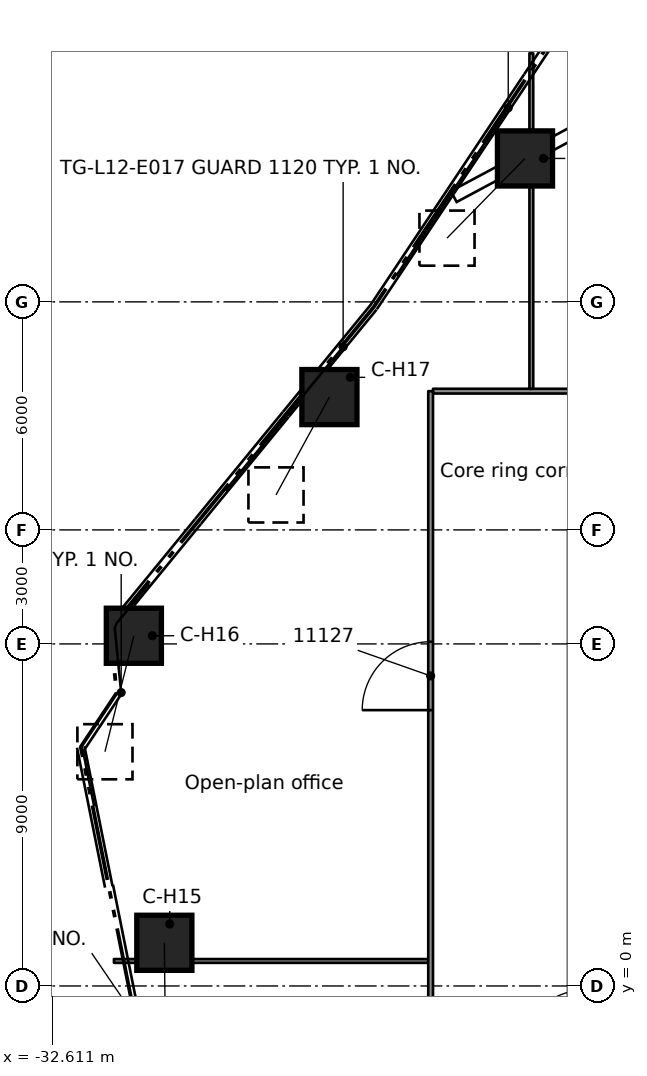
"""IFC4 building model, lengths in metres.
Left out: names, types, materials, properties, quantities, classifications, styles, units other than length and angle.
Written with IfcOpenShell. Run it as: python <this file> out.ifc"""

import sys

from ifc_helpers import new_model, si_unit, direction, frame, frame_2d, origin, origin_2d, place, context, subcontext, project, spatial, rectangle, extrude, element, fill, save


model = new_model("IFC4")
c1 = context("Model", 3, precision=1e-05, world=origin(), true_north=direction((0.0, 1.0)))
c2 = subcontext(c1, "Body", "Model", "MODEL_VIEW")
j1 = project(units=[si_unit("LENGTHUNIT", "METRE"), si_unit("PLANEANGLEUNIT", "RADIAN")], contexts=[c1])
p1 = place(None, origin())
s1 = spatial("IfcSite", under=j1, at=p1, CompositionType="ELEMENT")
p2 = place(p1, origin())
s2 = spatial("IfcBuilding", under=s1, at=p2, CompositionType="ELEMENT")
p3 = place(p2, frame((0.0, 0.0, 54.8)))
s3 = spatial("IfcBuildingStorey", under=s2, at=p3, CompositionType="ELEMENT", Elevation=54.8)
p4 = place(p3, frame((-29.657, 1.136, 0.508), z_axis=(0.007877610375, -0.701048970737, 0.713069620643), x_axis=(0.999936872126, 0.011236180934, 0.0)))
e1 = element("IfcColumn", 1, at=p4, inside=s3, PredefinedType="COLUMN", context=c2, shape_type="SweptSolid", body=[
    extrude(rectangle(XDim=1.45, YDim=1.45, at=origin_2d()), origin(), (0.0, 0.0, 1.0), 4.184),
])
p5 = place(p3, frame((-30.459, 9.215, 0.53), z_axis=(-0.176721352289, -0.708756376313, 0.682959707948), x_axis=(0.970292981686, -0.241932903281, 0.0)))
e2 = element("IfcColumn", 2, at=p5, inside=s3, PredefinedType="COLUMN", context=c2, shape_type="SweptSolid", body=[
    extrude(rectangle(XDim=1.45, YDim=1.45, at=origin_2d()), origin(), (0.0, 0.0, 1.0), 4.306),
])
p6 = place(p3, frame((-25.313, 15.495, 0.508), z_axis=(-0.336025835882, -0.61545416164, 0.71295358372), x_axis=(0.877701520343, -0.479207722379, 0.0)))
e3 = element("IfcColumn", 3, at=p6, inside=s3, PredefinedType="COLUMN", context=c2, shape_type="SweptSolid", body=[
    extrude(rectangle(XDim=1.45, YDim=1.45, at=origin_2d()), origin(), (0.0, 0.0, 1.0), 4.184),
])
p7 = place(p3, frame((-20.167, 21.774, 0.508), z_axis=(-0.490424057431, -0.501160289027, 0.712967466716), x_axis=(0.714720981693, -0.699409692761, 0.0)))
e4 = element("IfcColumn", 4, at=p7, inside=s3, PredefinedType="COLUMN", context=c2, shape_type="SweptSolid", body=[
    extrude(rectangle(XDim=1.45, YDim=1.45, at=origin_2d()), origin(), (0.0, 0.0, 1.0), 4.184),
])
p8 = place(p3, frame((-30.983, 0.658, 0.0), z_axis=(0.0, 0.0, 1.0), x_axis=(1.0, 0.0, 0.0)))
e5 = element("IfcWall", 5, at=p8, inside=s3, PredefinedType="PARTITIONING", context=c2, shape_type="SweptSolid", body=[
    extrude(rectangle(XDim=8.271, YDim=0.1, at=frame_2d((4.135, 0.0))), origin(), (0.0, 0.0, 1.0), 3.58),
])
p9 = place(p3, frame((-22.587, 15.651, 0.0), z_axis=(0.0, 0.0, 1.0), x_axis=(1.0, 0.0, 0.0)))
e6 = element("IfcWall", 6, at=p9, inside=s3, PredefinedType="PARTITIONING", context=c2, shape_type="SweptSolid", body=[
    extrude(rectangle(XDim=10.427, YDim=0.125, at=frame_2d((5.213, 0.0))), origin(), (0.0, 0.0, 1.0), 3.58),
])
p10 = place(p9, frame((5.688, 0.0, 0.0)))
e7 = element("IfcOpeningElement", 7, at=p10, cuts=e6, PredefinedType="OPENING", context=c2, shape_type="SweptSolid", body=[
    extrude(rectangle(XDim=1.8, YDim=2.1, at=frame_2d((0.9, 1.05))), frame((0.0, 0.073, 0.0), z_axis=(0.0, -1.0, 0.0), x_axis=(1.0, 0.0, 0.0)), (0.0, 0.0, 1.0), 0.145),
])
p11 = place(p3, frame((-20.0, 15.713, 0.0), z_axis=(0.0, 0.0, 1.0), x_axis=(0.0, 1.0, 0.0)))
e8 = element("IfcWall", 8, at=p11, inside=s3, PredefinedType="PARTITIONING", context=c2, shape_type="SweptSolid", body=[
    extrude(rectangle(XDim=8.829, YDim=0.1, at=frame_2d((4.415, 0.0))), origin(), (0.0, 0.0, 1.0), 3.58),
])
p12 = place(p3, frame((-22.65, -14.332, 0.0), z_axis=(0.0, 0.0, 1.0), x_axis=(0.0, 1.0, 0.0)))
e9 = element("IfcWall", 9, at=p12, inside=s3, PredefinedType="PARTITIONING", context=c2, shape_type="SweptSolid", body=[
    extrude(rectangle(XDim=29.983, YDim=0.125, at=frame_2d((14.991, 0.0))), origin(), (0.0, 0.0, 1.0), 3.58),
])
p13 = place(p12, frame((6.6, 0.0, 0.0)))
e10 = element("IfcOpeningElement", 10, at=p13, cuts=e9, PredefinedType="OPENING", context=c2, shape_type="SweptSolid", body=[
    extrude(rectangle(XDim=1.8, YDim=2.1, at=frame_2d((0.9, 1.05))), frame((0.0, 0.073, 0.0), z_axis=(0.0, -1.0, 0.0), x_axis=(1.0, 0.0, 0.0)), (0.0, 0.0, 1.0), 0.145),
])
p14 = place(p12, frame((21.59, 0.0, 0.0)))
e11 = element("IfcOpeningElement", 11, at=p14, cuts=e9, PredefinedType="OPENING", context=c2, shape_type="SweptSolid", body=[
    extrude(rectangle(XDim=1.8, YDim=2.1, at=frame_2d((0.9, 1.05))), frame((0.0, 0.073, 0.0), z_axis=(0.0, -1.0, 0.0), x_axis=(1.0, 0.0, 0.0)), (0.0, 0.0, 1.0), 0.145),
])
p15 = place(p14, origin())
e12 = element("IfcDoor", 12, at=p15, inside=s3, OperationType="DOUBLE_DOOR_SINGLE_SWING", PredefinedType="DOOR", context=c2, shape_type="SweptSolid", body=[
    extrude(rectangle(XDim=1.8, YDim=2.1, at=frame_2d((0.9, 1.05))), frame((0.0, 0.025, 0.0), z_axis=(0.0, -1.0, 0.0), x_axis=(1.0, 0.0, 0.0)), (0.0, 0.0, 1.0), 0.05),
])
fill(e11, e12)
save(model, sys.argv[1])
